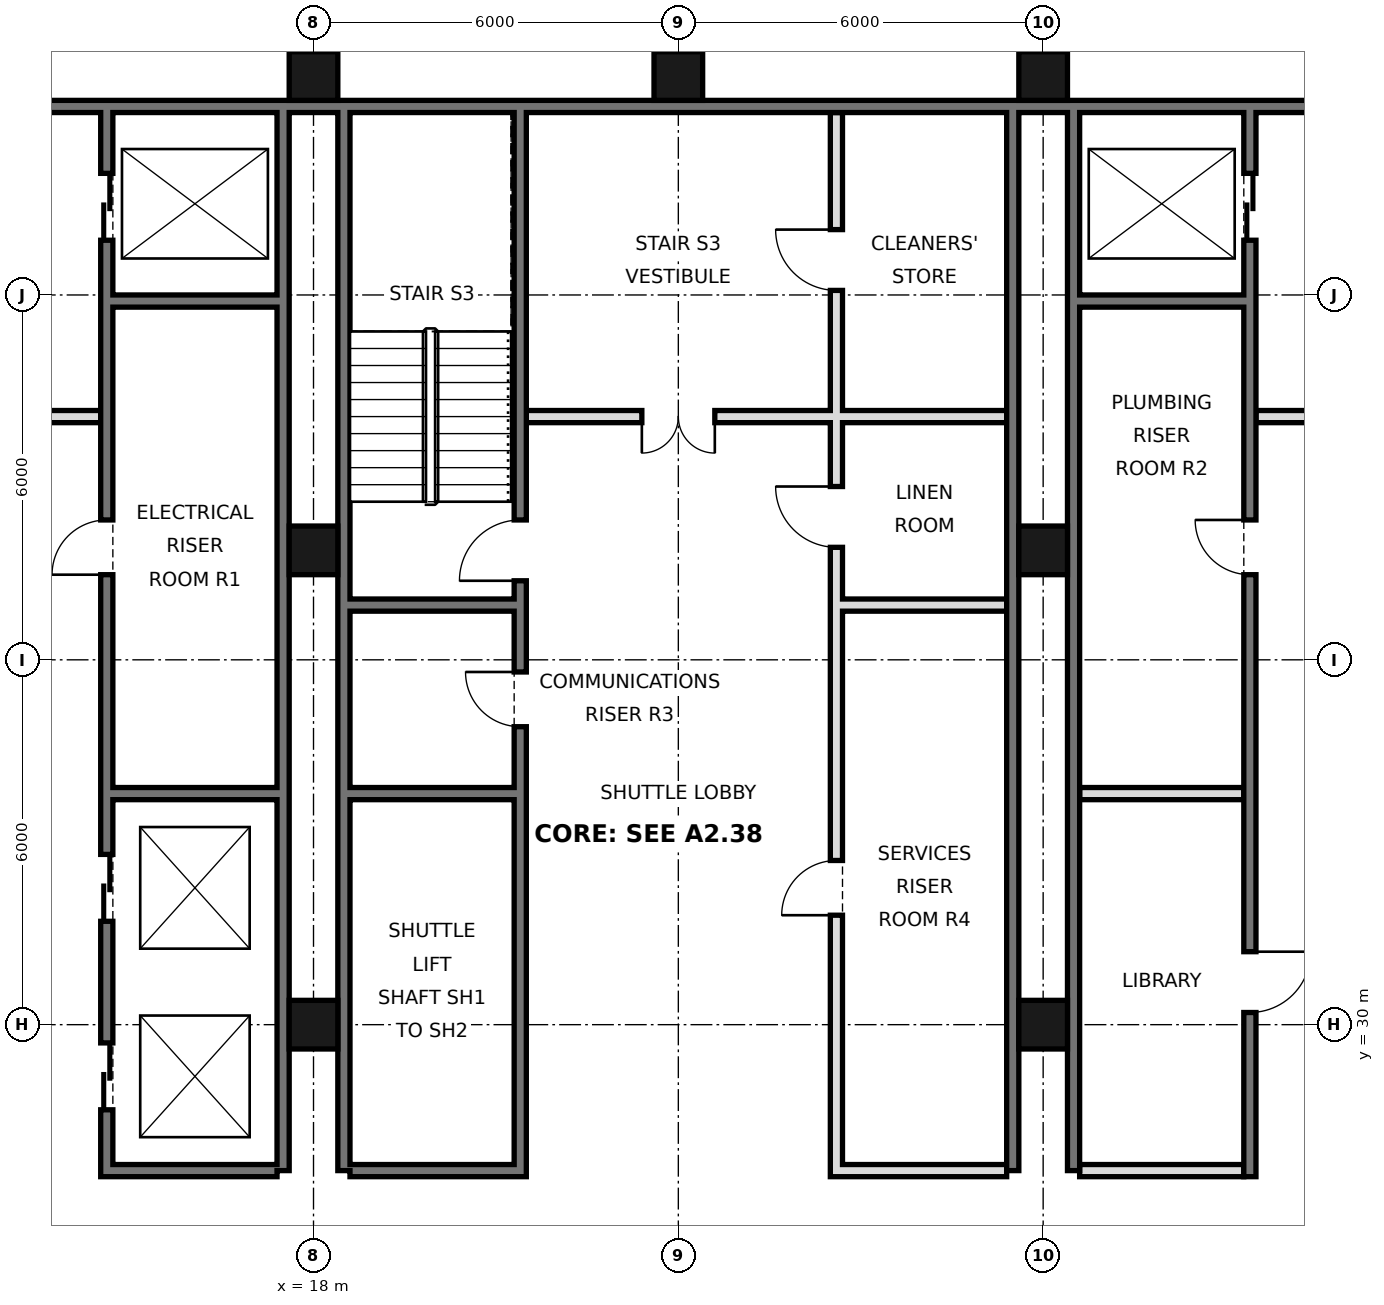
"""IFC4 building model, lengths in metres.
Left out: names, types, materials, properties, quantities, classifications, styles, units other than length and angle.
Written with IfcOpenShell. Run it as: python <this file> out.ifc"""

import sys

from ifc_helpers import new_model, si_unit, direction, frame, frame_2d, origin, origin_2d, place, context, subcontext, project, spatial, rectangle, hollow_rectangle, extrude, element, fill, save


model = new_model("IFC4")
c1 = context("Model", 3, precision=1e-05, world=origin(), true_north=direction((0.0, 1.0)))
c2 = subcontext(c1, "Body", "Model", "MODEL_VIEW")
j1 = project(units=[si_unit("LENGTHUNIT", "METRE"), si_unit("PLANEANGLEUNIT", "RADIAN")], contexts=[c1])
p1 = place(None, origin())
s1 = spatial("IfcSite", under=j1, at=p1, CompositionType="ELEMENT")
p2 = place(p1, origin())
s2 = spatial("IfcBuilding", under=s1, at=p2, CompositionType="ELEMENT")
p3 = place(p2, frame((0.0, 0.0, 151.0)))
s3 = spatial("IfcBuildingStorey", under=s2, at=p3, CompositionType="ELEMENT", Elevation=151.0)
for number, where, z_axis, x_axis in (
    (1, (18.0, 30.0, 0.0), (0.0, 0.0, 1.0), (1.0, 0.0, 0.0)),
    (2, (18.0, 37.8, 0.0), (0.0, 0.0, 1.0), (1.0, 0.0, 0.0)),
    (3, (18.0, 45.6, 0.0), (0.0, 0.0, 1.0), (1.0, 0.0, 0.0)),
    (4, (24.0, 45.6, 0.0), (0.0, 0.0, 1.0), (1.0, 0.0, 0.0)),
    (5, (30.0, 30.0, 0.0), (0.0, 0.0, 1.0), (1.0, 0.0, 0.0)),
    (6, (30.0, 37.8, 0.0), (0.0, 0.0, 1.0), (1.0, 0.0, 0.0)),
    (7, (30.0, 45.6, 0.0), (0.0, 0.0, 1.0), (1.0, 0.0, 0.0)),
):
    element("IfcColumn", number, at=place(p3, frame(where, z_axis=z_axis, x_axis=x_axis)), inside=s3, PredefinedType="COLUMN", context=c2, shape_type="SweptSolid", body=[
        extrude(hollow_rectangle(XDim=0.8, YDim=0.8, WallThickness=0.045, at=origin_2d()), origin(), (0.0, 0.0, 1.0), 3.6),
    ])
p4 = place(p3, frame((6.6, 45.1, 0.0), z_axis=(0.0, 0.0, 1.0), x_axis=(1.0, 0.0, 0.0)))
e8 = element("IfcWall", 8, at=p4, inside=s3, PredefinedType="SOLIDWALL", context=c2, shape_type="SweptSolid", body=[
    extrude(rectangle(XDim=34.8, YDim=0.2, at=frame_2d((17.4, 0.0))), origin(), (0.0, 0.0, 1.0), 3.42),
])
for number, where, z_axis, x_axis in (
    (9, (17.5, 27.6, 0.0), (0.0, 0.0, 1.0), (0.0, 1.0, 0.0)),
    (10, (18.5, 27.6, 0.0), (0.0, 0.0, 1.0), (0.0, 1.0, 0.0)),
    (11, (29.5, 27.6, 0.0), (0.0, 0.0, 1.0), (0.0, 1.0, 0.0)),
    (12, (30.5, 27.6, 0.0), (0.0, 0.0, 1.0), (0.0, 1.0, 0.0)),
):
    element("IfcWall", number, at=place(p3, frame(where, z_axis=z_axis, x_axis=x_axis)), inside=s3, PredefinedType="SOLIDWALL", context=c2, shape_type="SweptSolid", body=[
        extrude(rectangle(XDim=17.5, YDim=0.2, at=frame_2d((8.75, 0.0))), origin(), (0.0, 0.0, 1.0), 3.42),
    ])
p5 = place(p3, frame((14.6, 27.5, 0.0), z_axis=(0.0, 0.0, 1.0), x_axis=(0.0, 1.0, 0.0)))
e13 = element("IfcWall", 13, at=p5, inside=s3, PredefinedType="SOLIDWALL", context=c2, shape_type="SweptSolid", body=[
    extrude(rectangle(XDim=17.5, YDim=0.2, at=frame_2d((8.75, 0.0))), origin(), (0.0, 0.0, 1.0), 3.42),
])
p6 = place(p5, frame((1.1, 0.0, 0.0)))
e14 = element("IfcOpeningElement", 14, at=p6, cuts=e13, PredefinedType="OPENING", context=c2, shape_type="SweptSolid", body=[
    extrude(rectangle(XDim=1.1, YDim=2.1, at=frame_2d((0.55, 1.05))), frame((0.0, 0.11, 0.0), z_axis=(0.0, -1.0, 0.0), x_axis=(1.0, 0.0, 0.0)), (0.0, 0.0, 1.0), 0.22),
])
p7 = place(p5, frame((4.2, 0.0, 0.0)))
e15 = element("IfcOpeningElement", 15, at=p7, cuts=e13, PredefinedType="OPENING", context=c2, shape_type="SweptSolid", body=[
    extrude(rectangle(XDim=1.1, YDim=2.1, at=frame_2d((0.55, 1.05))), frame((0.0, 0.11, 0.0), z_axis=(0.0, -1.0, 0.0), x_axis=(1.0, 0.0, 0.0)), (0.0, 0.0, 1.0), 0.22),
])
p8 = place(p5, frame((15.4, 0.0, 0.0)))
e16 = element("IfcOpeningElement", 16, at=p8, cuts=e13, PredefinedType="OPENING", context=c2, shape_type="SweptSolid", body=[
    extrude(rectangle(XDim=1.1, YDim=2.1, at=frame_2d((0.55, 1.05))), frame((0.0, 0.11, 0.0), z_axis=(0.0, -1.0, 0.0), x_axis=(1.0, 0.0, 0.0)), (0.0, 0.0, 1.0), 0.22),
])
p9 = place(p5, frame((9.9, 0.0, 0.0)))
e17 = element("IfcOpeningElement", 17, at=p9, cuts=e13, PredefinedType="OPENING", context=c2, shape_type="SweptSolid", body=[
    extrude(rectangle(XDim=0.9, YDim=2.1, at=frame_2d((0.45, 1.05))), frame((0.0, 0.11, 0.0), z_axis=(0.0, -1.0, 0.0), x_axis=(1.0, 0.0, 0.0)), (0.0, 0.0, 1.0), 0.22),
])
p10 = place(p3, frame((21.4, 27.5, 0.0), z_axis=(0.0, 0.0, 1.0), x_axis=(0.0, 1.0, 0.0)))
e18 = element("IfcWall", 18, at=p10, inside=s3, PredefinedType="SOLIDWALL", context=c2, shape_type="SweptSolid", body=[
    extrude(rectangle(XDim=17.5, YDim=0.2, at=frame_2d((8.75, 0.0))), origin(), (0.0, 0.0, 1.0), 3.42),
])
p11 = place(p10, frame((9.8, 0.0, 0.0)))
e19 = element("IfcOpeningElement", 19, at=p11, cuts=e18, PredefinedType="OPENING", context=c2, shape_type="SweptSolid", body=[
    extrude(rectangle(XDim=1.0, YDim=2.1, at=frame_2d((0.5, 1.05))), frame((0.0, 0.11, 0.0), z_axis=(0.0, -1.0, 0.0), x_axis=(1.0, 0.0, 0.0)), (0.0, 0.0, 1.0), 0.22),
])
p12 = place(p10, frame((7.4, 0.0, 0.0)))
e20 = element("IfcOpeningElement", 20, at=p12, cuts=e18, PredefinedType="OPENING", context=c2, shape_type="SweptSolid", body=[
    extrude(rectangle(XDim=0.9, YDim=2.1, at=frame_2d((0.45, 1.05))), frame((0.0, 0.11, 0.0), z_axis=(0.0, -1.0, 0.0), x_axis=(1.0, 0.0, 0.0)), (0.0, 0.0, 1.0), 0.22),
])
p13 = place(p3, frame((26.6, 27.5, 0.0), z_axis=(0.0, 0.0, 1.0), x_axis=(0.0, 1.0, 0.0)))
e21 = element("IfcWall", 21, at=p13, inside=s3, PredefinedType="SOLIDWALL", context=c2, shape_type="SweptSolid", body=[
    extrude(rectangle(XDim=17.5, YDim=0.2, at=frame_2d((8.75, 0.0))), origin(), (0.0, 0.0, 1.0), 3.42),
])
p14 = place(p13, frame((4.3, 0.0, 0.0)))
e22 = element("IfcOpeningElement", 22, at=p14, cuts=e21, PredefinedType="OPENING", context=c2, shape_type="SweptSolid", body=[
    extrude(rectangle(XDim=0.9, YDim=2.1, at=frame_2d((0.45, 1.05))), frame((0.0, 0.11, 0.0), z_axis=(0.0, -1.0, 0.0), x_axis=(1.0, 0.0, 0.0)), (0.0, 0.0, 1.0), 0.22),
])
p15 = place(p13, frame((10.35, 0.0, 0.0)))
e23 = element("IfcOpeningElement", 23, at=p15, cuts=e21, PredefinedType="OPENING", context=c2, shape_type="SweptSolid", body=[
    extrude(rectangle(XDim=1.0, YDim=2.1, at=frame_2d((0.5, 1.05))), frame((0.0, 0.11, 0.0), z_axis=(0.0, -1.0, 0.0), x_axis=(1.0, 0.0, 0.0)), (0.0, 0.0, 1.0), 0.22),
])
p16 = place(p13, frame((14.575, 0.0, 0.0)))
e24 = element("IfcOpeningElement", 24, at=p16, cuts=e21, PredefinedType="OPENING", context=c2, shape_type="SweptSolid", body=[
    extrude(rectangle(XDim=1.0, YDim=2.1, at=frame_2d((0.5, 1.05))), frame((0.0, 0.11, 0.0), z_axis=(0.0, -1.0, 0.0), x_axis=(1.0, 0.0, 0.0)), (0.0, 0.0, 1.0), 0.22),
])
p17 = place(p3, frame((33.4, 27.5, 0.0), z_axis=(0.0, 0.0, 1.0), x_axis=(0.0, 1.0, 0.0)))
e25 = element("IfcWall", 25, at=p17, inside=s3, PredefinedType="SOLIDWALL", context=c2, shape_type="SweptSolid", body=[
    extrude(rectangle(XDim=17.5, YDim=0.2, at=frame_2d((8.75, 0.0))), origin(), (0.0, 0.0, 1.0), 3.42),
])
p18 = place(p17, frame((15.4, 0.0, 0.0)))
e26 = element("IfcOpeningElement", 26, at=p18, cuts=e25, PredefinedType="OPENING", context=c2, shape_type="SweptSolid", body=[
    extrude(rectangle(XDim=1.1, YDim=2.1, at=frame_2d((0.55, 1.05))), frame((0.0, 0.11, 0.0), z_axis=(0.0, -1.0, 0.0), x_axis=(1.0, 0.0, 0.0)), (0.0, 0.0, 1.0), 0.22),
])
p19 = place(p17, frame((2.7, 0.0, 0.0)))
e27 = element("IfcOpeningElement", 27, at=p19, cuts=e25, PredefinedType="OPENING", context=c2, shape_type="SweptSolid", body=[
    extrude(rectangle(XDim=1.0, YDim=2.1, at=frame_2d((0.5, 1.05))), frame((0.0, 0.11, 0.0), z_axis=(0.0, -1.0, 0.0), x_axis=(1.0, 0.0, 0.0)), (0.0, 0.0, 1.0), 0.22),
])
p20 = place(p17, frame((9.9, 0.0, 0.0)))
e28 = element("IfcOpeningElement", 28, at=p20, cuts=e25, PredefinedType="OPENING", context=c2, shape_type="SweptSolid", body=[
    extrude(rectangle(XDim=0.9, YDim=2.1, at=frame_2d((0.45, 1.05))), frame((0.0, 0.11, 0.0), z_axis=(0.0, -1.0, 0.0), x_axis=(1.0, 0.0, 0.0)), (0.0, 0.0, 1.0), 0.22),
])
for number, where, z_axis, x_axis in (
    (29, (14.7, 27.6, 0.0), (0.0, 0.0, 1.0), (1.0, 0.0, 0.0)),
    (30, (18.6, 27.6, 0.0), (0.0, 0.0, 1.0), (1.0, 0.0, 0.0)),
    (31, (26.7, 27.6, 0.0), (0.0, 0.0, 1.0), (1.0, 0.0, 0.0)),
):
    element("IfcWall", number, at=place(p3, frame(where, z_axis=z_axis, x_axis=x_axis)), inside=s3, PredefinedType="SOLIDWALL", context=c2, shape_type="SweptSolid", body=[
        extrude(rectangle(XDim=2.7, YDim=0.2, at=frame_2d((1.35, 0.0))), origin(), (0.0, 0.0, 1.0), 3.42),
    ])
p21 = place(p3, frame((30.6, 27.6, 0.0), z_axis=(0.0, 0.0, 1.0), x_axis=(1.0, 0.0, 0.0)))
e32 = element("IfcWall", 32, at=p21, inside=s3, PredefinedType="PARTITIONING", context=c2, shape_type="SweptSolid", body=[
    extrude(rectangle(XDim=2.7, YDim=0.2, at=frame_2d((1.35, 0.0))), origin(), (0.0, 0.0, 1.0), 3.42),
])
for number, where, z_axis, x_axis in (
    (33, (14.7, 33.8, 0.0), (0.0, 0.0, 1.0), (1.0, 0.0, 0.0)),
    (34, (18.6, 33.8, 0.0), (0.0, 0.0, 1.0), (1.0, 0.0, 0.0)),
    (35, (30.6, 33.8, 0.0), (0.0, 0.0, 1.0), (1.0, 0.0, 0.0)),
    (36, (18.6, 36.9, 0.0), (0.0, 0.0, 1.0), (1.0, 0.0, 0.0)),
    (37, (26.7, 36.9, 0.0), (0.0, 0.0, 1.0), (1.0, 0.0, 0.0)),
):
    element("IfcWall", number, at=place(p3, frame(where, z_axis=z_axis, x_axis=x_axis)), inside=s3, PredefinedType="SOLIDWALL", context=c2, shape_type="SweptSolid", body=[
        extrude(rectangle(XDim=2.7, YDim=0.2, at=frame_2d((1.35, 0.0))), origin(), (0.0, 0.0, 1.0), 3.42),
    ])
p22 = place(p3, frame((21.5, 40.0, 0.0), z_axis=(0.0, 0.0, 1.0), x_axis=(1.0, 0.0, 0.0)))
e38 = element("IfcWall", 38, at=p22, inside=s3, PredefinedType="PARTITIONING", context=c2, shape_type="SweptSolid", body=[
    extrude(rectangle(XDim=7.9, YDim=0.2, at=frame_2d((3.95, 0.0))), origin(), (0.0, 0.0, 1.0), 3.42),
])
p23 = place(p22, frame((1.9, 0.0, 0.0)))
e39 = element("IfcOpeningElement", 39, at=p23, cuts=e38, PredefinedType="OPENING", context=c2, shape_type="SweptSolid", body=[
    extrude(rectangle(XDim=1.2, YDim=2.1, at=frame_2d((0.6, 1.05))), frame((0.0, 0.11, 0.0), z_axis=(0.0, -1.0, 0.0), x_axis=(1.0, 0.0, 0.0)), (0.0, 0.0, 1.0), 0.22),
])
p24 = place(p3, frame((33.5, 40.0, 0.0), z_axis=(0.0, 0.0, 1.0), x_axis=(1.0, 0.0, 0.0)))
e40 = element("IfcWall", 40, at=p24, inside=s3, PredefinedType="PARTITIONING", context=c2, shape_type="SweptSolid", body=[
    extrude(rectangle(XDim=5.0, YDim=0.2, at=frame_2d((2.5, 0.0))), origin(), (0.0, 0.0, 1.0), 3.42),
])
p25 = place(p24, frame((1.9, 0.0, 0.0)))
e41 = element("IfcOpeningElement", 41, at=p25, cuts=e40, PredefinedType="OPENING", context=c2, shape_type="SweptSolid", body=[
    extrude(rectangle(XDim=1.2, YDim=2.1, at=frame_2d((0.6, 1.05))), frame((0.0, 0.11, 0.0), z_axis=(0.0, -1.0, 0.0), x_axis=(1.0, 0.0, 0.0)), (0.0, 0.0, 1.0), 0.22),
])
p26 = place(p3, frame((9.5, 40.0, 0.0), z_axis=(0.0, 0.0, 1.0), x_axis=(1.0, 0.0, 0.0)))
e42 = element("IfcWall", 42, at=p26, inside=s3, PredefinedType="PARTITIONING", context=c2, shape_type="SweptSolid", body=[
    extrude(rectangle(XDim=5.0, YDim=0.2, at=frame_2d((2.5, 0.0))), origin(), (0.0, 0.0, 1.0), 3.42),
])
p27 = place(p26, frame((1.9, 0.0, 0.0)))
e43 = element("IfcOpeningElement", 43, at=p27, cuts=e42, PredefinedType="OPENING", context=c2, shape_type="SweptSolid", body=[
    extrude(rectangle(XDim=1.2, YDim=2.1, at=frame_2d((0.6, 1.05))), frame((0.0, 0.11, 0.0), z_axis=(0.0, -1.0, 0.0), x_axis=(1.0, 0.0, 0.0)), (0.0, 0.0, 1.0), 0.22),
])
for number, where, z_axis, x_axis in (
    (44, (14.7, 41.9, 0.0), (0.0, 0.0, 1.0), (1.0, 0.0, 0.0)),
    (45, (30.6, 41.9, 0.0), (0.0, 0.0, 1.0), (1.0, 0.0, 0.0)),
):
    element("IfcWall", number, at=place(p3, frame(where, z_axis=z_axis, x_axis=x_axis)), inside=s3, PredefinedType="SOLIDWALL", context=c2, shape_type="SweptSolid", body=[
        extrude(rectangle(XDim=2.7, YDim=0.2, at=frame_2d((1.35, 0.0))), origin(), (0.0, 0.0, 1.0), 3.42),
    ])
p28 = place(p23, frame((1.2, 0.0, 0.0), z_axis=(0.0, 0.0, 1.0), x_axis=(-1.0, 0.0, 0.0)))
e46 = element("IfcDoor", 46, at=p28, inside=s3, OperationType="DOUBLE_DOOR_SINGLE_SWING", PredefinedType="DOOR", context=c2, shape_type="SweptSolid", body=[
    extrude(rectangle(XDim=1.2, YDim=2.1, at=frame_2d((0.6, 1.05))), frame((0.0, 0.025, 0.0), z_axis=(0.0, -1.0, 0.0), x_axis=(1.0, 0.0, 0.0)), (0.0, 0.0, 1.0), 0.05),
])
fill(e39, e46)
p29 = place(p18, origin())
e47 = element("IfcDoor", 47, at=p29, inside=s3, OperationType="DOUBLE_DOOR_SLIDING", PredefinedType="DOOR", context=c2, shape_type="SweptSolid", body=[
    extrude(rectangle(XDim=1.1, YDim=2.1, at=frame_2d((0.55, 1.05))), frame((0.0, 0.025, 0.0), z_axis=(0.0, -1.0, 0.0), x_axis=(1.0, 0.0, 0.0)), (0.0, 0.0, 1.0), 0.05),
])
fill(e26, e47)
p30 = place(p6, origin())
e48 = element("IfcDoor", 48, at=p30, inside=s3, OperationType="DOUBLE_DOOR_SLIDING", PredefinedType="DOOR", context=c2, shape_type="SweptSolid", body=[
    extrude(rectangle(XDim=1.1, YDim=2.1, at=frame_2d((0.55, 1.05))), frame((0.0, 0.025, 0.0), z_axis=(0.0, -1.0, 0.0), x_axis=(1.0, 0.0, 0.0)), (0.0, 0.0, 1.0), 0.05),
])
fill(e14, e48)
p31 = place(p7, origin())
e49 = element("IfcDoor", 49, at=p31, inside=s3, OperationType="DOUBLE_DOOR_SLIDING", PredefinedType="DOOR", context=c2, shape_type="SweptSolid", body=[
    extrude(rectangle(XDim=1.1, YDim=2.1, at=frame_2d((0.55, 1.05))), frame((0.0, 0.025, 0.0), z_axis=(0.0, -1.0, 0.0), x_axis=(1.0, 0.0, 0.0)), (0.0, 0.0, 1.0), 0.05),
])
fill(e15, e49)
p32 = place(p8, origin())
e50 = element("IfcDoor", 50, at=p32, inside=s3, OperationType="DOUBLE_DOOR_SLIDING", PredefinedType="DOOR", context=c2, shape_type="SweptSolid", body=[
    extrude(rectangle(XDim=1.1, YDim=2.1, at=frame_2d((0.55, 1.05))), frame((0.0, 0.025, 0.0), z_axis=(0.0, -1.0, 0.0), x_axis=(1.0, 0.0, 0.0)), (0.0, 0.0, 1.0), 0.05),
])
fill(e16, e50)
p33 = place(p19, origin())
e51 = element("IfcDoor", 51, at=p33, inside=s3, OperationType="SINGLE_SWING_RIGHT", PredefinedType="DOOR", context=c2, shape_type="SweptSolid", body=[
    extrude(rectangle(XDim=1.0, YDim=2.1, at=frame_2d((0.5, 1.05))), frame((0.0, 0.025, 0.0), z_axis=(0.0, -1.0, 0.0), x_axis=(1.0, 0.0, 0.0)), (0.0, 0.0, 1.0), 0.05),
])
fill(e27, e51)
p34 = place(p11, origin())
e52 = element("IfcDoor", 52, at=p34, inside=s3, OperationType="SINGLE_SWING_LEFT", PredefinedType="DOOR", context=c2, shape_type="SweptSolid", body=[
    extrude(rectangle(XDim=1.0, YDim=2.1, at=frame_2d((0.5, 1.05))), frame((0.0, 0.025, 0.0), z_axis=(0.0, -1.0, 0.0), x_axis=(1.0, 0.0, 0.0)), (0.0, 0.0, 1.0), 0.05),
])
fill(e19, e52)
p35 = place(p9, origin())
e53 = element("IfcDoor", 53, at=p35, inside=s3, OperationType="SINGLE_SWING_LEFT", PredefinedType="DOOR", context=c2, shape_type="SweptSolid", body=[
    extrude(rectangle(XDim=0.9, YDim=2.1, at=frame_2d((0.45, 1.05))), frame((0.0, 0.025, 0.0), z_axis=(0.0, -1.0, 0.0), x_axis=(1.0, 0.0, 0.0)), (0.0, 0.0, 1.0), 0.05),
])
fill(e17, e53)
p36 = place(p20, frame((0.9, 0.0, 0.0), z_axis=(0.0, 0.0, 1.0), x_axis=(-1.0, 0.0, 0.0)))
e54 = element("IfcDoor", 54, at=p36, inside=s3, OperationType="SINGLE_SWING_LEFT", PredefinedType="DOOR", context=c2, shape_type="SweptSolid", body=[
    extrude(rectangle(XDim=0.9, YDim=2.1, at=frame_2d((0.45, 1.05))), frame((0.0, 0.025, 0.0), z_axis=(0.0, -1.0, 0.0), x_axis=(1.0, 0.0, 0.0)), (0.0, 0.0, 1.0), 0.05),
])
fill(e28, e54)
p37 = place(p12, frame((0.9, 0.0, 0.0), z_axis=(0.0, 0.0, 1.0), x_axis=(-1.0, 0.0, 0.0)))
e55 = element("IfcDoor", 55, at=p37, inside=s3, OperationType="SINGLE_SWING_LEFT", PredefinedType="DOOR", context=c2, shape_type="SweptSolid", body=[
    extrude(rectangle(XDim=0.9, YDim=2.1, at=frame_2d((0.45, 1.05))), frame((0.0, 0.025, 0.0), z_axis=(0.0, -1.0, 0.0), x_axis=(1.0, 0.0, 0.0)), (0.0, 0.0, 1.0), 0.05),
])
fill(e20, e55)
p38 = place(p14, origin())
e56 = element("IfcDoor", 56, at=p38, inside=s3, OperationType="SINGLE_SWING_LEFT", PredefinedType="DOOR", context=c2, shape_type="SweptSolid", body=[
    extrude(rectangle(XDim=0.9, YDim=2.1, at=frame_2d((0.45, 1.05))), frame((0.0, 0.025, 0.0), z_axis=(0.0, -1.0, 0.0), x_axis=(1.0, 0.0, 0.0)), (0.0, 0.0, 1.0), 0.05),
])
fill(e22, e56)
p39 = place(p15, frame((1.0, 0.0, 0.0), z_axis=(0.0, 0.0, 1.0), x_axis=(-1.0, 0.0, 0.0)))
e57 = element("IfcDoor", 57, at=p39, inside=s3, OperationType="SINGLE_SWING_LEFT", PredefinedType="DOOR", context=c2, shape_type="SweptSolid", body=[
    extrude(rectangle(XDim=1.0, YDim=2.1, at=frame_2d((0.5, 1.05))), frame((0.0, 0.025, 0.0), z_axis=(0.0, -1.0, 0.0), x_axis=(1.0, 0.0, 0.0)), (0.0, 0.0, 1.0), 0.05),
])
fill(e23, e57)
p40 = place(p16, frame((1.0, 0.0, 0.0), z_axis=(0.0, 0.0, 1.0), x_axis=(-1.0, 0.0, 0.0)))
e58 = element("IfcDoor", 58, at=p40, inside=s3, OperationType="SINGLE_SWING_LEFT", PredefinedType="DOOR", context=c2, shape_type="SweptSolid", body=[
    extrude(rectangle(XDim=1.0, YDim=2.1, at=frame_2d((0.5, 1.05))), frame((0.0, 0.025, 0.0), z_axis=(0.0, -1.0, 0.0), x_axis=(1.0, 0.0, 0.0)), (0.0, 0.0, 1.0), 0.05),
])
fill(e24, e58)
save(model, sys.argv[1])
